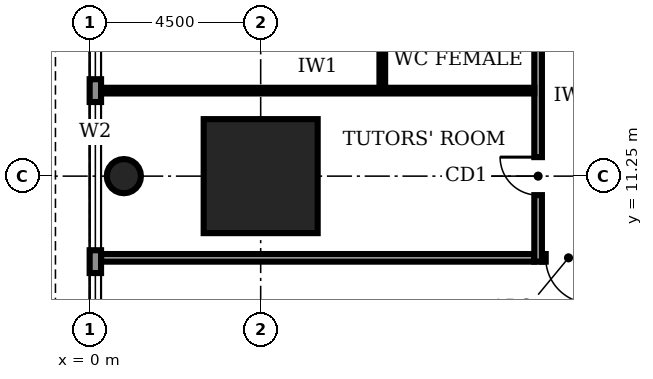
"""IFC4 building model, lengths in metres.
Left out: names, types, materials, properties, quantities, classifications, styles, units other than length and angle.
Written with IfcOpenShell. Run it as: python <this file> out.ifc"""

import sys

from ifc_helpers import new_model, si_unit, direction, frame, frame_2d, origin, origin_2d, place, context, subcontext, project, spatial, rectangle, circle, extrude, element, fill, save


model = new_model("IFC4")
c1 = context("Model", 3, precision=1e-05, world=origin(), true_north=direction((0.0, 1.0)))
c2 = subcontext(c1, "Body", "Model", "MODEL_VIEW")
j1 = project(units=[si_unit("LENGTHUNIT", "METRE"), si_unit("PLANEANGLEUNIT", "RADIAN")], contexts=[c1])
p1 = place(None, origin())
s1 = spatial("IfcSite", under=j1, at=p1, CompositionType="ELEMENT")
p2 = place(p1, origin())
s2 = spatial("IfcBuilding", under=s1, at=p2, CompositionType="ELEMENT")
p3 = place(p2, frame((0.0, 0.0, 6.0)))
s3 = spatial("IfcBuildingStorey", under=s2, at=p3, CompositionType="ELEMENT", Elevation=6.0)
p4 = place(p3, frame((4.5, 11.25, 0.0), z_axis=(0.0, 0.0, 1.0), x_axis=(1.0, 0.0, 0.0)))
e1 = element("IfcColumn", 1, at=p4, inside=s3, PredefinedType="COLUMN", context=c2, shape_type="SweptSolid", body=[
    extrude(rectangle(XDim=3.0, YDim=3.0, at=origin_2d()), origin(), (0.0, 0.0, 1.0), 5.0),
])
p5 = place(p3, frame((0.9, 11.25, 0.0), z_axis=(0.0, 0.0, 1.0), x_axis=(1.0, 0.0, 0.0)))
e2 = element("IfcColumn", 2, at=p5, inside=s3, PredefinedType="COLUMN", context=c2, shape_type="SweptSolid", body=[
    extrude(circle(Radius=0.45, at=origin_2d()), origin(), (0.0, 0.0, 1.0), 5.0),
])
p6 = place(p3, frame((0.15, 49.48, 0.0), z_axis=(0.0, 0.0, 1.0), x_axis=(0.0, -1.0, 0.0)))
e3 = element("IfcWall", 3, at=p6, inside=s3, PredefinedType="STANDARD", context=c2, shape_type="SweptSolid", body=[
    extrude(rectangle(XDim=53.96, YDim=0.3, at=frame_2d((26.98, 0.0))), origin(), (0.0, 0.0, 1.0), 4.7),
])
p7 = place(p6, frame((49.78, 0.0, 0.6)))
e4 = element("IfcOpeningElement", 4, at=p7, cuts=e3, PredefinedType="OPENING", context=c2, shape_type="SweptSolid", body=[
    extrude(rectangle(XDim=3.9, YDim=2.6, at=frame_2d((1.95, 1.3))), frame((0.0, 0.16, 0.0), z_axis=(0.0, -1.0, 0.0), x_axis=(1.0, 0.0, 0.0)), (0.0, 0.0, 1.0), 0.32),
])
p8 = place(p6, frame((45.28, 0.0, 0.6)))
e5 = element("IfcOpeningElement", 5, at=p8, cuts=e3, PredefinedType="OPENING", context=c2, shape_type="SweptSolid", body=[
    extrude(rectangle(XDim=3.9, YDim=2.6, at=frame_2d((1.95, 1.3))), frame((0.0, 0.16, 0.0), z_axis=(0.0, -1.0, 0.0), x_axis=(1.0, 0.0, 0.0)), (0.0, 0.0, 1.0), 0.32),
])
p9 = place(p6, frame((40.78, 0.0, 0.6)))
e6 = element("IfcOpeningElement", 6, at=p9, cuts=e3, PredefinedType="OPENING", context=c2, shape_type="SweptSolid", body=[
    extrude(rectangle(XDim=3.9, YDim=2.6, at=frame_2d((1.95, 1.3))), frame((0.0, 0.16, 0.0), z_axis=(0.0, -1.0, 0.0), x_axis=(1.0, 0.0, 0.0)), (0.0, 0.0, 1.0), 0.32),
])
p10 = place(p6, frame((36.28, 0.0, 0.6)))
e7 = element("IfcOpeningElement", 7, at=p10, cuts=e3, PredefinedType="OPENING", context=c2, shape_type="SweptSolid", body=[
    extrude(rectangle(XDim=3.9, YDim=2.6, at=frame_2d((1.95, 1.3))), frame((0.0, 0.16, 0.0), z_axis=(0.0, -1.0, 0.0), x_axis=(1.0, 0.0, 0.0)), (0.0, 0.0, 1.0), 0.32),
])
p11 = place(p6, frame((31.78, 0.0, 0.6)))
e8 = element("IfcOpeningElement", 8, at=p11, cuts=e3, PredefinedType="OPENING", context=c2, shape_type="SweptSolid", body=[
    extrude(rectangle(XDim=3.9, YDim=2.6, at=frame_2d((1.95, 1.3))), frame((0.0, 0.16, 0.0), z_axis=(0.0, -1.0, 0.0), x_axis=(1.0, 0.0, 0.0)), (0.0, 0.0, 1.0), 0.32),
])
p12 = place(p6, frame((27.28, 0.0, 0.6)))
e9 = element("IfcOpeningElement", 9, at=p12, cuts=e3, PredefinedType="OPENING", context=c2, shape_type="SweptSolid", body=[
    extrude(rectangle(XDim=3.9, YDim=2.6, at=frame_2d((1.95, 1.3))), frame((0.0, 0.16, 0.0), z_axis=(0.0, -1.0, 0.0), x_axis=(1.0, 0.0, 0.0)), (0.0, 0.0, 1.0), 0.32),
])
p13 = place(p6, frame((22.78, 0.0, 0.6)))
e10 = element("IfcOpeningElement", 10, at=p13, cuts=e3, PredefinedType="OPENING", context=c2, shape_type="SweptSolid", body=[
    extrude(rectangle(XDim=3.9, YDim=2.6, at=frame_2d((1.95, 1.3))), frame((0.0, 0.16, 0.0), z_axis=(0.0, -1.0, 0.0), x_axis=(1.0, 0.0, 0.0)), (0.0, 0.0, 1.0), 0.32),
])
p14 = place(p6, frame((18.28, 0.0, 0.6)))
e11 = element("IfcOpeningElement", 11, at=p14, cuts=e3, PredefinedType="OPENING", context=c2, shape_type="SweptSolid", body=[
    extrude(rectangle(XDim=3.9, YDim=2.6, at=frame_2d((1.95, 1.3))), frame((0.0, 0.16, 0.0), z_axis=(0.0, -1.0, 0.0), x_axis=(1.0, 0.0, 0.0)), (0.0, 0.0, 1.0), 0.32),
])
p15 = place(p6, frame((13.78, 0.0, 0.6)))
e12 = element("IfcOpeningElement", 12, at=p15, cuts=e3, PredefinedType="OPENING", context=c2, shape_type="SweptSolid", body=[
    extrude(rectangle(XDim=3.9, YDim=2.6, at=frame_2d((1.95, 1.3))), frame((0.0, 0.16, 0.0), z_axis=(0.0, -1.0, 0.0), x_axis=(1.0, 0.0, 0.0)), (0.0, 0.0, 1.0), 0.32),
])
p16 = place(p6, frame((9.28, 0.0, 0.6)))
e13 = element("IfcOpeningElement", 13, at=p16, cuts=e3, PredefinedType="OPENING", context=c2, shape_type="SweptSolid", body=[
    extrude(rectangle(XDim=3.9, YDim=2.6, at=frame_2d((1.95, 1.3))), frame((0.0, 0.16, 0.0), z_axis=(0.0, -1.0, 0.0), x_axis=(1.0, 0.0, 0.0)), (0.0, 0.0, 1.0), 0.32),
])
p17 = place(p6, frame((4.78, 0.0, 0.6)))
e14 = element("IfcOpeningElement", 14, at=p17, cuts=e3, PredefinedType="OPENING", context=c2, shape_type="SweptSolid", body=[
    extrude(rectangle(XDim=3.9, YDim=2.6, at=frame_2d((1.95, 1.3))), frame((0.0, 0.16, 0.0), z_axis=(0.0, -1.0, 0.0), x_axis=(1.0, 0.0, 0.0)), (0.0, 0.0, 1.0), 0.32),
])
p18 = place(p3, frame((11.9, 9.1, 0.0), z_axis=(0.0, 0.0, 1.0), x_axis=(1.0, 0.0, 0.0)))
e15 = element("IfcWall", 15, at=p18, inside=s3, PredefinedType="SOLIDWALL", context=c2, shape_type="SweptSolid", body=[
    extrude(rectangle(XDim=16.9, YDim=0.2, at=frame_2d((8.45, 0.0))), origin(), (0.0, 0.0, 1.0), 4.7),
])
p19 = place(p18, frame((0.1, 0.0, 0.0)))
e16 = element("IfcOpeningElement", 16, at=p19, cuts=e15, PredefinedType="OPENING", context=c2, shape_type="SweptSolid", body=[
    extrude(rectangle(XDim=1.2, YDim=2.4, at=frame_2d((0.6, 1.2))), frame((0.0, 0.11, 0.0), z_axis=(0.0, -1.0, 0.0), x_axis=(1.0, 0.0, 0.0)), (0.0, 0.0, 1.0), 0.22),
])
p20 = place(p18, frame((2.35, 0.0, 0.0)))
e17 = element("IfcOpeningElement", 17, at=p20, cuts=e15, PredefinedType="OPENING", context=c2, shape_type="SweptSolid", body=[
    extrude(rectangle(XDim=2.0, YDim=2.4, at=frame_2d((1.0, 1.2))), frame((0.0, 0.11, 0.0), z_axis=(0.0, -1.0, 0.0), x_axis=(1.0, 0.0, 0.0)), (0.0, 0.0, 1.0), 0.22),
])
p21 = place(p18, frame((12.35, 0.0, 0.0)))
e18 = element("IfcOpeningElement", 18, at=p21, cuts=e15, PredefinedType="OPENING", context=c2, shape_type="SweptSolid", body=[
    extrude(rectangle(XDim=2.0, YDim=2.4, at=frame_2d((1.0, 1.2))), frame((0.0, 0.11, 0.0), z_axis=(0.0, -1.0, 0.0), x_axis=(1.0, 0.0, 0.0)), (0.0, 0.0, 1.0), 0.22),
])
p22 = place(p18, frame((15.425, 0.0, 0.0)))
e19 = element("IfcOpeningElement", 19, at=p22, cuts=e15, PredefinedType="OPENING", context=c2, shape_type="SweptSolid", body=[
    extrude(rectangle(XDim=1.0, YDim=2.1, at=frame_2d((0.5, 1.05))), frame((0.0, 0.11, 0.0), z_axis=(0.0, -1.0, 0.0), x_axis=(1.0, 0.0, 0.0)), (0.0, 0.0, 1.0), 0.22),
])
p23 = place(p3, frame((11.8, 31.3, 0.0), z_axis=(0.0, 0.0, 1.0), x_axis=(0.0, -1.0, 0.0)))
e20 = element("IfcWall", 20, at=p23, inside=s3, PredefinedType="SOLIDWALL", context=c2, shape_type="SweptSolid", body=[
    extrude(rectangle(XDim=22.3, YDim=0.2, at=frame_2d((11.15, 0.0))), origin(), (0.0, 0.0, 1.0), 4.7),
])
p24 = place(p23, frame((19.55, 0.0, 0.0)))
e21 = element("IfcOpeningElement", 21, at=p24, cuts=e20, PredefinedType="OPENING", context=c2, shape_type="SweptSolid", body=[
    extrude(rectangle(XDim=1.0, YDim=2.1, at=frame_2d((0.5, 1.05))), frame((0.0, 0.11, 0.0), z_axis=(0.0, -1.0, 0.0), x_axis=(1.0, 0.0, 0.0)), (0.0, 0.0, 1.0), 0.22),
])
p25 = place(p23, frame((15.45, 0.0, 0.0)))
e22 = element("IfcOpeningElement", 22, at=p25, cuts=e20, PredefinedType="OPENING", context=c2, shape_type="SweptSolid", body=[
    extrude(rectangle(XDim=0.9, YDim=2.1, at=frame_2d((0.45, 1.05))), frame((0.0, 0.11, 0.0), z_axis=(0.0, -1.0, 0.0), x_axis=(1.0, 0.0, 0.0)), (0.0, 0.0, 1.0), 0.22),
])
p26 = place(p23, frame((12.45, 0.0, 0.0)))
e23 = element("IfcOpeningElement", 23, at=p26, cuts=e20, PredefinedType="OPENING", context=c2, shape_type="SweptSolid", body=[
    extrude(rectangle(XDim=0.9, YDim=2.1, at=frame_2d((0.45, 1.05))), frame((0.0, 0.11, 0.0), z_axis=(0.0, -1.0, 0.0), x_axis=(1.0, 0.0, 0.0)), (0.0, 0.0, 1.0), 0.22),
])
p27 = place(p23, frame((7.6, 0.0, 0.0)))
e24 = element("IfcOpeningElement", 24, at=p27, cuts=e20, PredefinedType="OPENING", context=c2, shape_type="SweptSolid", body=[
    extrude(rectangle(XDim=0.9, YDim=2.1, at=frame_2d((0.45, 1.05))), frame((0.0, 0.11, 0.0), z_axis=(0.0, -1.0, 0.0), x_axis=(1.0, 0.0, 0.0)), (0.0, 0.0, 1.0), 0.22),
])
p28 = place(p23, frame((4.8, 0.0, 0.0)))
e25 = element("IfcOpeningElement", 25, at=p28, cuts=e20, PredefinedType="OPENING", context=c2, shape_type="SweptSolid", body=[
    extrude(rectangle(XDim=1.0, YDim=2.1, at=frame_2d((0.5, 1.05))), frame((0.0, 0.11, 0.0), z_axis=(0.0, -1.0, 0.0), x_axis=(1.0, 0.0, 0.0)), (0.0, 0.0, 1.0), 0.22),
])
p29 = place(p23, frame((10.3, 0.0, 0.0)))
e26 = element("IfcOpeningElement", 26, at=p29, cuts=e20, PredefinedType="OPENING", context=c2, shape_type="SweptSolid", body=[
    extrude(rectangle(XDim=1.0, YDim=2.1, at=frame_2d((0.5, 1.05))), frame((0.0, 0.11, 0.0), z_axis=(0.0, -1.0, 0.0), x_axis=(1.0, 0.0, 0.0)), (0.0, 0.0, 1.0), 0.22),
])
p30 = place(p23, frame((2.8, 0.0, 0.0)))
e27 = element("IfcOpeningElement", 27, at=p30, cuts=e20, PredefinedType="OPENING", context=c2, shape_type="SweptSolid", body=[
    extrude(rectangle(XDim=1.2, YDim=2.4, at=frame_2d((0.6, 1.2))), frame((0.0, 0.11, 0.0), z_axis=(0.0, -1.0, 0.0), x_axis=(1.0, 0.0, 0.0)), (0.0, 0.0, 1.0), 0.22),
])
p31 = place(p23, frame((1.45, 0.0, 0.0)))
e28 = element("IfcOpeningElement", 28, at=p31, cuts=e20, PredefinedType="OPENING", context=c2, shape_type="SweptSolid", body=[
    extrude(rectangle(XDim=1.2, YDim=2.4, at=frame_2d((0.6, 1.2))), frame((0.0, 0.11, 0.0), z_axis=(0.0, -1.0, 0.0), x_axis=(1.0, 0.0, 0.0)), (0.0, 0.0, 1.0), 0.22),
])
p32 = place(p3, frame((0.3, 9.1, 0.0), z_axis=(0.0, 0.0, 1.0), x_axis=(1.0, 0.0, 0.0)))
e29 = element("IfcWall", 29, at=p32, inside=s3, PredefinedType="SOLIDWALL", context=c2, shape_type="SweptSolid", body=[
    extrude(rectangle(XDim=11.4, YDim=0.2, at=frame_2d((5.7, 0.0))), origin(), (0.0, 0.0, 1.0), 4.7),
])
p33 = place(p3, frame((0.3, 13.5, 0.0), z_axis=(0.0, 0.0, 1.0), x_axis=(1.0, 0.0, 0.0)))
e30 = element("IfcWall", 30, at=p33, inside=s3, PredefinedType="PARTITIONING", context=c2, shape_type="SweptSolid", body=[
    extrude(rectangle(XDim=11.4, YDim=0.15, at=frame_2d((5.7, 0.0))), origin(), (0.0, 0.0, 1.0), 4.7),
])
p34 = place(p3, frame((7.7, 13.5, 0.0), z_axis=(0.0, 0.0, 1.0), x_axis=(0.0, 1.0, 0.0)))
e31 = element("IfcWall", 31, at=p34, inside=s3, PredefinedType="PARTITIONING", context=c2, shape_type="SweptSolid", body=[
    extrude(rectangle(XDim=3.8, YDim=0.15, at=frame_2d((1.9, 0.0))), origin(), (0.0, 0.0, 1.0), 4.7),
])
p35 = place(p9, origin())
e32 = element("IfcWindow", 32, at=p35, inside=s3, PartitioningType="SINGLE_PANEL", PredefinedType="WINDOW", context=c2, shape_type="SweptSolid", body=[
    extrude(rectangle(XDim=3.9, YDim=2.6, at=frame_2d((1.95, 1.3))), frame((0.0, 0.03, 0.0), z_axis=(0.0, -1.0, 0.0), x_axis=(1.0, 0.0, 0.0)), (0.0, 0.0, 1.0), 0.06),
])
fill(e6, e32)
p36 = place(p10, origin())
e33 = element("IfcWindow", 33, at=p36, inside=s3, PartitioningType="SINGLE_PANEL", PredefinedType="WINDOW", context=c2, shape_type="SweptSolid", body=[
    extrude(rectangle(XDim=3.9, YDim=2.6, at=frame_2d((1.95, 1.3))), frame((0.0, 0.03, 0.0), z_axis=(0.0, -1.0, 0.0), x_axis=(1.0, 0.0, 0.0)), (0.0, 0.0, 1.0), 0.06),
])
fill(e7, e33)
p37 = place(p11, origin())
e34 = element("IfcWindow", 34, at=p37, inside=s3, PartitioningType="SINGLE_PANEL", PredefinedType="WINDOW", context=c2, shape_type="SweptSolid", body=[
    extrude(rectangle(XDim=3.9, YDim=2.6, at=frame_2d((1.95, 1.3))), frame((0.0, 0.03, 0.0), z_axis=(0.0, -1.0, 0.0), x_axis=(1.0, 0.0, 0.0)), (0.0, 0.0, 1.0), 0.06),
])
fill(e8, e34)
p38 = place(p19, frame((1.2, 0.0, 0.0), z_axis=(0.0, 0.0, 1.0), x_axis=(-1.0, 0.0, 0.0)))
e35 = element("IfcDoor", 35, at=p38, inside=s3, OperationType="SINGLE_SWING_LEFT", PredefinedType="DOOR", context=c2, shape_type="SweptSolid", body=[
    extrude(rectangle(XDim=1.2, YDim=2.4, at=frame_2d((0.6, 1.2))), frame((0.0, 0.025, 0.0), z_axis=(0.0, -1.0, 0.0), x_axis=(1.0, 0.0, 0.0)), (0.0, 0.0, 1.0), 0.05),
])
fill(e16, e35)
p39 = place(p24, frame((1.0, 0.0, 0.0), z_axis=(0.0, 0.0, 1.0), x_axis=(-1.0, 0.0, 0.0)))
e36 = element("IfcDoor", 36, at=p39, inside=s3, OperationType="SINGLE_SWING_RIGHT", PredefinedType="DOOR", context=c2, shape_type="SweptSolid", body=[
    extrude(rectangle(XDim=1.0, YDim=2.1, at=frame_2d((0.5, 1.05))), frame((0.0, 0.025, 0.0), z_axis=(0.0, -1.0, 0.0), x_axis=(1.0, 0.0, 0.0)), (0.0, 0.0, 1.0), 0.05),
])
fill(e21, e36)
save(model, sys.argv[1])
